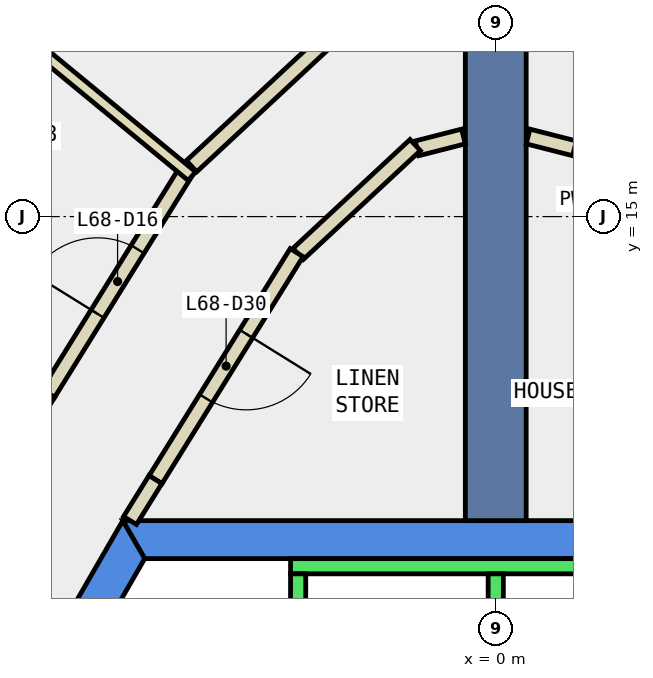
"""IFC4 building model, lengths in metres.
Left out: names, types, materials, properties, quantities, classifications, styles, units other than length and angle.
Written with IfcOpenShell. Run it as: python <this file> out.ifc"""

import sys

from ifc_helpers import new_model, si_unit, direction, frame, frame_2d, origin, place, context, subcontext, project, spatial, polyline, rectangle, outline, extrude, element, fill, save


model = new_model("IFC4")
c1 = context("Model", 3, precision=1e-05, world=origin(), true_north=direction((0.0, 1.0)))
c2 = subcontext(c1, "Body", "Model", "MODEL_VIEW")
j1 = project(units=[si_unit("LENGTHUNIT", "METRE"), si_unit("PLANEANGLEUNIT", "RADIAN")], contexts=[c1])
p1 = place(None, origin())
s1 = spatial("IfcSite", under=j1, at=p1, CompositionType="ELEMENT")
p2 = place(p1, origin())
s2 = spatial("IfcBuilding", under=s1, at=p2, CompositionType="ELEMENT")
p3 = place(p2, frame((0.0, 0.0, 293.6)))
s3 = spatial("IfcBuildingStorey", under=s2, at=p3, CompositionType="ELEMENT", Elevation=293.6)
p4 = place(p3, frame((0.0, 0.0, -0.34)))
e1 = element("IfcWall", 1, at=p4, inside=s3, PredefinedType="SHEAR", context=c2, shape_type="SweptSolid", body=[
    extrude(outline(polyline([(4.907, 11.0), (-4.907, 11.0), (-4.619, 10.5), (4.619, 10.5), (4.907, 11.0)])), origin(), (0.0, 0.0, 1.0), 3.6),
])
p5 = place(p3, frame((0.0, 0.0, -0.34)))
e2 = element("IfcWall", 2, at=p5, inside=s3, PredefinedType="SHEAR", context=c2, shape_type="SweptSolid", body=[
    extrude(outline(polyline([(-9.236, 3.502), (-8.803, 3.253), (-4.619, 10.5), (-4.907, 11.0), (-9.236, 3.502)])), origin(), (0.0, 0.0, 1.0), 3.6),
])
p6 = place(p3, frame((0.0, 11.0, -0.34), z_axis=(0.0, 0.0, 1.0), x_axis=(0.0, 1.0, 0.0)))
e3 = element("IfcWall", 3, at=p6, inside=s3, PredefinedType="SHEAR", context=c2, shape_type="SweptSolid", body=[
    extrude(rectangle(XDim=9.0, YDim=0.8, at=frame_2d((4.5, 0.0))), origin(), (0.0, 0.0, 1.0), 3.6),
])
p7 = place(p3, frame((2.6, 14.509, 0.0), z_axis=(0.0, 0.0, 1.0), x_axis=(-0.732355024595, 0.680922989735, 0.0)))
e4 = element("IfcWall", 4, at=p7, inside=s3, PredefinedType="PARTITIONING", context=c2, shape_type="SweptSolid", body=[
    extrude(rectangle(XDim=2.103, YDim=0.2, at=frame_2d((1.051, 0.0))), origin(), (0.0, 0.0, 1.0), 3.26),
])
for number, where, z_axis, x_axis in (
    (5, (1.036, 15.898, 0.0), (0.0, 0.0, 1.0), (-0.969, 0.247, 0.0)),
    (6, (-0.425, 16.054, 0.0), (0.0, 0.0, 1.0), (-0.969, -0.247, 0.0)),
):
    element("IfcWall", number, at=place(p3, frame(where, z_axis=z_axis, x_axis=x_axis)), inside=s3, PredefinedType="PARTITIONING", context=c2, shape_type="SweptSolid", body=[
        extrude(rectangle(XDim=0.63, YDim=0.2, at=frame_2d((0.315, 0.0))), origin(), (0.0, 0.0, 1.0), 3.26),
    ])
p8 = place(p3, frame((-1.06, 15.941, 0.0), z_axis=(0.0, 0.0, 1.0), x_axis=(-0.732355024595, -0.680922989735, 0.0)))
e7 = element("IfcWall", 7, at=p8, inside=s3, PredefinedType="PARTITIONING", context=c2, shape_type="SweptSolid", body=[
    extrude(rectangle(XDim=2.103, YDim=0.2, at=frame_2d((1.051, 0.0))), origin(), (0.0, 0.0, 1.0), 3.26),
])
p9 = place(p3, frame((-2.62, 14.526, 0.0), z_axis=(0.0, 0.0, 1.0), x_axis=(-0.527787942423, -0.849376175692, 0.0)))
e8 = element("IfcWall", 8, at=p9, inside=s3, PredefinedType="PARTITIONING", context=c2, shape_type="SweptSolid", body=[
    extrude(rectangle(XDim=3.517, YDim=0.2, at=frame_2d((1.758, 0.0))), origin(), (0.0, 0.0, 1.0), 3.26),
])
p10 = place(p9, frame((1.258, 0.0, 0.0)))
e9 = element("IfcOpeningElement", 9, at=p10, cuts=e8, PredefinedType="OPENING", context=c2, shape_type="SweptSolid", body=[
    extrude(rectangle(XDim=1.0, YDim=2.1, at=frame_2d((0.5, 1.05))), frame((0.0, 0.11, 0.0), z_axis=(0.0, -1.0, 0.0), x_axis=(1.0, 0.0, 0.0)), (0.0, 0.0, 1.0), 0.22),
])
p11 = place(p3, frame((-4.478, 11.54, 0.0), z_axis=(0.0, 0.0, 1.0), x_axis=(-0.527362861778, -0.849640166198, 0.0)))
e10 = element("IfcWall", 10, at=p11, inside=s3, PredefinedType="PARTITIONING", context=c2, shape_type="SweptSolid", body=[
    extrude(rectangle(XDim=0.633, YDim=0.2, at=frame_2d((0.317, 0.0))), origin(), (0.0, 0.0, 1.0), 3.26),
])
p12 = place(p3, frame((-4.002, 15.663, 0.0), z_axis=(0.0, 0.0, 1.0), x_axis=(0.732331154554, 0.680948661846, 0.0)))
e11 = element("IfcWall", 11, at=p12, inside=s3, PredefinedType="PARTITIONING", context=c2, shape_type="SweptSolid", body=[
    extrude(rectangle(XDim=2.803, YDim=0.2, at=frame_2d((1.402, 0.0))), origin(), (0.0, 0.0, 1.0), 3.26),
])
p13 = place(p3, frame((-5.889, 12.675, 0.0), z_axis=(0.0, 0.0, 1.0), x_axis=(0.527550626699, 0.849523593709, 0.0)))
e12 = element("IfcWall", 12, at=p13, inside=s3, PredefinedType="PARTITIONING", context=c2, shape_type="SweptSolid", body=[
    extrude(rectangle(XDim=3.463, YDim=0.2, at=frame_2d((1.731, 0.0))), origin(), (0.0, 0.0, 1.0), 3.26),
])
p14 = place(p13, frame((1.231, 0.0, 0.0)))
e13 = element("IfcOpeningElement", 13, at=p14, cuts=e12, PredefinedType="OPENING", context=c2, shape_type="SweptSolid", body=[
    extrude(rectangle(XDim=1.0, YDim=2.1, at=frame_2d((0.5, 1.05))), frame((0.0, 0.11, 0.0), z_axis=(0.0, -1.0, 0.0), x_axis=(1.0, 0.0, 0.0)), (0.0, 0.0, 1.0), 0.22),
])
p15 = place(p3, frame((-7.472, 10.127, 0.0), z_axis=(0.0, 0.0, 1.0), x_axis=(0.527707224705, 0.849426326996, 0.0)))
e14 = element("IfcWall", 14, at=p15, inside=s3, PredefinedType="PARTITIONING", context=c2, shape_type="SweptSolid", body=[
    extrude(rectangle(XDim=3.0, YDim=0.2, at=frame_2d((1.5, 0.0))), origin(), (0.0, 0.0, 1.0), 3.26),
])
p16 = place(p3, frame((-3.998, 15.532, 0.0), z_axis=(0.0, 0.0, 1.0), x_axis=(-0.771938186867, 0.635697597649, 0.0)))
e15 = element("IfcWall", 15, at=p16, inside=s3, PredefinedType="PARTITIONING", context=c2, shape_type="SweptSolid", body=[
    extrude(rectangle(XDim=4.432, YDim=0.15, at=frame_2d((2.216, 0.0))), origin(), (0.0, 0.0, 1.0), 3.26),
])
p17 = place(p3, frame((2.7, 10.4, 0.0), z_axis=(0.0, 0.0, 1.0), x_axis=(-1.0, 0.0, 0.0)))
e16 = element("IfcWall", 16, at=p17, inside=s3, PredefinedType="STANDARD", context=c2, shape_type="SweptSolid", body=[
    extrude(rectangle(XDim=5.4, YDim=0.2, at=frame_2d((2.7, 0.0))), origin(), (0.0, 0.0, 1.0), 3.26),
])
for number, where, z_axis, x_axis in (
    (17, (0.0, 7.9, 0.0), (0.0, 0.0, 1.0), (0.0, 1.0, 0.0)),
    (18, (-2.6, 7.9, 0.0), (0.0, 0.0, 1.0), (0.0, 1.0, 0.0)),
):
    element("IfcWall", number, at=place(p3, frame(where, z_axis=z_axis, x_axis=x_axis)), inside=s3, PredefinedType="STANDARD", context=c2, shape_type="SweptSolid", body=[
        extrude(rectangle(XDim=2.4, YDim=0.2, at=frame_2d((1.2, 0.0))), origin(), (0.0, 0.0, 1.0), 3.26),
    ])
p18 = place(p14, origin())
e19 = element("IfcDoor", 19, at=p18, inside=s3, OperationType="SINGLE_SWING_LEFT", PredefinedType="DOOR", context=c2, shape_type="SweptSolid", body=[
    extrude(rectangle(XDim=1.0, YDim=2.1, at=frame_2d((0.5, 1.05))), frame((0.0, 0.025, 0.0), z_axis=(0.0, -1.0, 0.0), x_axis=(1.0, 0.0, 0.0)), (0.0, 0.0, 1.0), 0.05),
])
fill(e13, e19)
p19 = place(p10, origin())
e20 = element("IfcDoor", 20, at=p19, inside=s3, OperationType="SINGLE_SWING_RIGHT", PredefinedType="DOOR", context=c2, shape_type="SweptSolid", body=[
    extrude(rectangle(XDim=1.0, YDim=2.1, at=frame_2d((0.5, 1.05))), frame((0.0, 0.025, 0.0), z_axis=(0.0, -1.0, 0.0), x_axis=(1.0, 0.0, 0.0)), (0.0, 0.0, 1.0), 0.05),
])
fill(e9, e20)
save(model, sys.argv[1])
